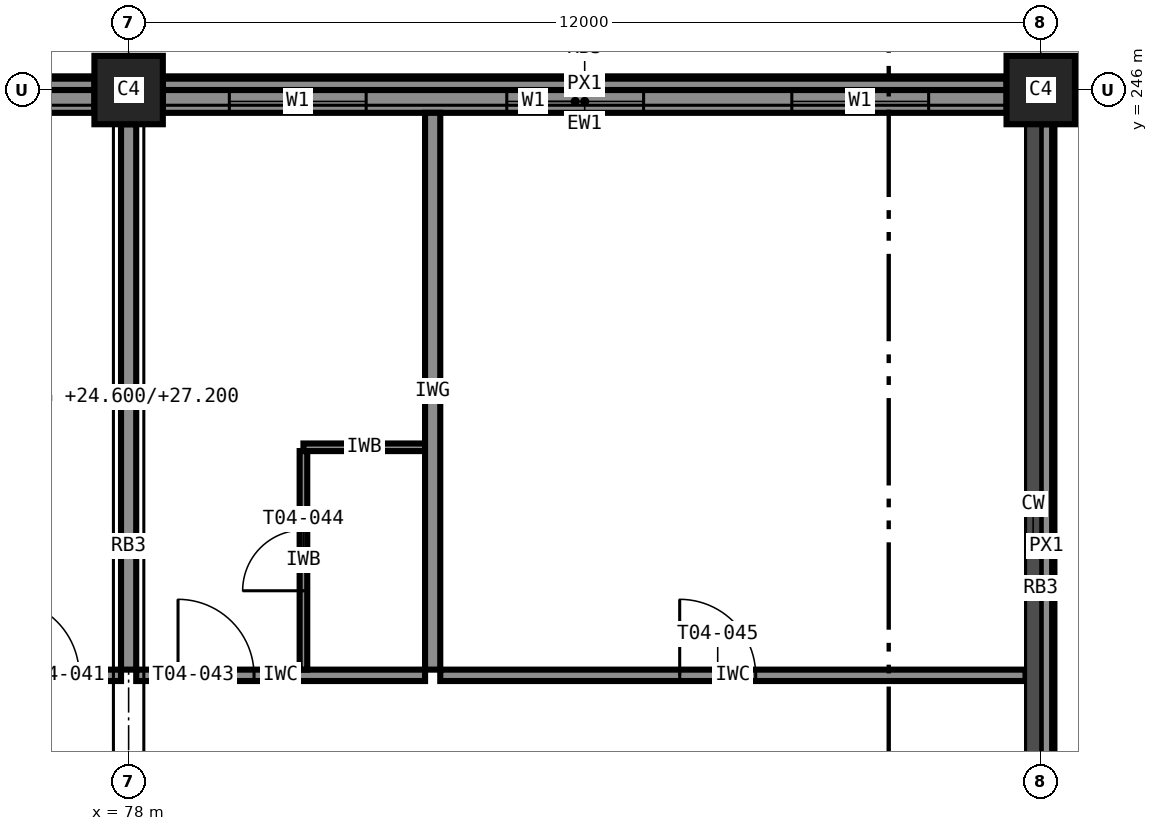
"""IFC4 building model, lengths in metres.
Left out: names, types, materials, properties, quantities, classifications, styles, units other than length and angle.
Written with IfcOpenShell. Run it as: python <this file> out.ifc"""

import sys

from ifc_helpers import new_model, si_unit, direction, frame, frame_2d, origin, origin_2d, place, context, subcontext, project, spatial, rectangle, extrude, element, fill, save


model = new_model("IFC4")
c1 = context("Model", 3, precision=1e-05, world=origin(), true_north=direction((0.0, 1.0)))
c2 = subcontext(c1, "Body", "Model", "MODEL_VIEW")
j1 = project(units=[si_unit("LENGTHUNIT", "METRE"), si_unit("PLANEANGLEUNIT", "RADIAN")], contexts=[c1])
p1 = place(None, origin())
s1 = spatial("IfcSite", under=j1, at=p1, CompositionType="ELEMENT")
p2 = place(p1, origin())
s2 = spatial("IfcBuilding", under=s1, at=p2, CompositionType="ELEMENT")
p3 = place(p2, frame((0.0, 0.0, 24.6)))
s3 = spatial("IfcBuildingStorey", under=s2, at=p3, CompositionType="ELEMENT", Elevation=24.6)
for number, where, z_axis, x_axis in (
    (1, (78.0, 246.0, 0.0), (0.0, 0.0, 1.0), (1.0, 0.0, 0.0)),
    (2, (90.0, 246.0, 0.0), (0.0, 0.0, 1.0), (1.0, 0.0, 0.0)),
):
    element("IfcColumn", number, at=place(p3, frame(where, z_axis=z_axis, x_axis=x_axis)), inside=s3, PredefinedType="COLUMN", context=c2, shape_type="SweptSolid", body=[
        extrude(rectangle(XDim=0.9, YDim=0.9, at=origin_2d()), origin(), (0.0, 0.0, 1.0), 3.6),
    ])
p4 = place(p3, frame((90.075, 234.45, 3.4), z_axis=(0.0, 0.0, 1.0), x_axis=(0.0, 1.0, 0.0)))
e3 = element("IfcWall", 3, at=p4, inside=s3, PredefinedType="STANDARD", context=c2, shape_type="SweptSolid", body=[
    extrude(rectangle(XDim=11.1, YDim=0.15, at=frame_2d((5.55, 0.0))), origin(), (0.0, 0.0, 1.0), 0.2),
])
p5 = place(p3, frame((89.55, 245.85, 0.0), z_axis=(0.0, 0.0, 1.0), x_axis=(-1.0, 0.0, 0.0)))
e4 = element("IfcWall", 4, at=p5, inside=s3, PredefinedType="STANDARD", context=c2, shape_type="SweptSolid", body=[
    extrude(rectangle(XDim=11.1, YDim=0.3, at=frame_2d((5.55, 0.0))), origin(), (0.0, 0.0, 1.0), 2.6),
])
p6 = place(p5, frame((8.425, 0.0, 0.85)))
e5 = element("IfcOpeningElement", 5, at=p6, cuts=e4, PredefinedType="OPENING", context=c2, shape_type="SweptSolid", body=[
    extrude(rectangle(XDim=1.8, YDim=1.75, at=frame_2d((0.9, 0.875))), frame((0.0, 0.16, 0.0), z_axis=(0.0, -1.0, 0.0), x_axis=(1.0, 0.0, 0.0)), (0.0, 0.0, 1.0), 0.32),
])
p7 = place(p5, frame((1.025, 0.0, 0.85)))
e6 = element("IfcOpeningElement", 6, at=p7, cuts=e4, PredefinedType="OPENING", context=c2, shape_type="SweptSolid", body=[
    extrude(rectangle(XDim=1.8, YDim=1.75, at=frame_2d((0.9, 0.875))), frame((0.0, 0.16, 0.0), z_axis=(0.0, -1.0, 0.0), x_axis=(1.0, 0.0, 0.0)), (0.0, 0.0, 1.0), 0.32),
])
p8 = place(p5, frame((4.775, 0.0, 0.85)))
e7 = element("IfcOpeningElement", 7, at=p8, cuts=e4, PredefinedType="OPENING", context=c2, shape_type="SweptSolid", body=[
    extrude(rectangle(XDim=1.8, YDim=1.75, at=frame_2d((0.9, 0.875))), frame((0.0, 0.16, 0.0), z_axis=(0.0, -1.0, 0.0), x_axis=(1.0, 0.0, 0.0)), (0.0, 0.0, 1.0), 0.32),
])
p9 = place(p3, frame((77.55, 245.85, 0.0), z_axis=(0.0, 0.0, 1.0), x_axis=(-1.0, 0.0, 0.0)))
e8 = element("IfcWall", 8, at=p9, inside=s3, PredefinedType="STANDARD", context=c2, shape_type="SweptSolid", body=[
    extrude(rectangle(XDim=11.1, YDim=0.3, at=frame_2d((5.55, 0.0))), origin(), (0.0, 0.0, 1.0), 2.6),
])
p10 = place(p9, frame((8.425, 0.0, 0.85)))
e9 = element("IfcOpeningElement", 9, at=p10, cuts=e8, PredefinedType="OPENING", context=c2, shape_type="SweptSolid", body=[
    extrude(rectangle(XDim=1.8, YDim=1.75, at=frame_2d((0.9, 0.875))), frame((0.0, 0.16, 0.0), z_axis=(0.0, -1.0, 0.0), x_axis=(1.0, 0.0, 0.0)), (0.0, 0.0, 1.0), 0.32),
])
p11 = place(p9, frame((4.65, 0.0, 0.85)))
e10 = element("IfcOpeningElement", 10, at=p11, cuts=e8, PredefinedType="OPENING", context=c2, shape_type="SweptSolid", body=[
    extrude(rectangle(XDim=1.8, YDim=1.75, at=frame_2d((0.9, 0.875))), frame((0.0, 0.16, 0.0), z_axis=(0.0, -1.0, 0.0), x_axis=(1.0, 0.0, 0.0)), (0.0, 0.0, 1.0), 0.32),
])
p12 = place(p9, frame((0.875, 0.0, 0.85)))
e11 = element("IfcOpeningElement", 11, at=p12, cuts=e8, PredefinedType="OPENING", context=c2, shape_type="SweptSolid", body=[
    extrude(rectangle(XDim=1.8, YDim=1.75, at=frame_2d((0.9, 0.875))), frame((0.0, 0.16, 0.0), z_axis=(0.0, -1.0, 0.0), x_axis=(1.0, 0.0, 0.0)), (0.0, 0.0, 1.0), 0.32),
])
for number, where, z_axis, x_axis in (
    (12, (89.55, 246.075, 3.4), (0.0, 0.0, 1.0), (-1.0, 0.0, 0.0)),
    (13, (77.55, 246.075, 3.4), (0.0, 0.0, 1.0), (-1.0, 0.0, 0.0)),
):
    element("IfcWall", number, at=place(p3, frame(where, z_axis=z_axis, x_axis=x_axis)), inside=s3, PredefinedType="STANDARD", context=c2, shape_type="SweptSolid", body=[
        extrude(rectangle(XDim=11.1, YDim=0.15, at=frame_2d((5.55, 0.0))), origin(), (0.0, 0.0, 1.0), 0.2),
    ])
p13 = place(p3, frame((74.1, 238.3, 0.0), z_axis=(0.0, 0.0, 1.0), x_axis=(1.0, 0.0, 0.0)))
e14 = element("IfcWall", 14, at=p13, inside=s3, PredefinedType="PARTITIONING", context=c2, shape_type="SweptSolid", body=[
    extrude(rectangle(XDim=3.8, YDim=0.15, at=frame_2d((1.9, 0.0))), origin(), (0.0, 0.0, 1.0), 3.4),
])
p14 = place(p13, frame((2.25, 0.0, 0.0)))
e15 = element("IfcOpeningElement", 15, at=p14, cuts=e14, PredefinedType="OPENING", context=c2, shape_type="SweptSolid", body=[
    extrude(rectangle(XDim=1.0, YDim=2.1, at=frame_2d((0.5, 1.05))), frame((0.0, 0.085, 0.0), z_axis=(0.0, -1.0, 0.0), x_axis=(1.0, 0.0, 0.0)), (0.0, 0.0, 1.0), 0.17),
])
p15 = place(p3, frame((78.1, 238.3, 0.0), z_axis=(0.0, 0.0, 1.0), x_axis=(1.0, 0.0, 0.0)))
e16 = element("IfcWall", 16, at=p15, inside=s3, PredefinedType="PARTITIONING", context=c2, shape_type="SweptSolid", body=[
    extrude(rectangle(XDim=3.8, YDim=0.15, at=frame_2d((1.9, 0.0))), origin(), (0.0, 0.0, 1.0), 3.4),
])
p16 = place(p15, frame((0.55, 0.0, 0.0)))
e17 = element("IfcOpeningElement", 17, at=p16, cuts=e16, PredefinedType="OPENING", context=c2, shape_type="SweptSolid", body=[
    extrude(rectangle(XDim=1.0, YDim=2.1, at=frame_2d((0.5, 1.05))), frame((0.0, 0.085, 0.0), z_axis=(0.0, -1.0, 0.0), x_axis=(1.0, 0.0, 0.0)), (0.0, 0.0, 1.0), 0.17),
])
p17 = place(p3, frame((80.3, 241.3, 0.0), z_axis=(0.0, 0.0, 1.0), x_axis=(1.0, 0.0, 0.0)))
e18 = element("IfcWall", 18, at=p17, inside=s3, PredefinedType="PARTITIONING", context=c2, shape_type="SweptSolid", body=[
    extrude(rectangle(XDim=1.6, YDim=0.1, at=frame_2d((0.8, 0.0))), origin(), (0.0, 0.0, 1.0), 3.4),
])
p18 = place(p3, frame((80.3, 238.375, 0.0), z_axis=(0.0, 0.0, 1.0), x_axis=(0.0, 1.0, 0.0)))
e19 = element("IfcWall", 19, at=p18, inside=s3, PredefinedType="PARTITIONING", context=c2, shape_type="SweptSolid", body=[
    extrude(rectangle(XDim=2.875, YDim=0.1, at=frame_2d((1.438, 0.0))), origin(), (0.0, 0.0, 1.0), 3.4),
])
p19 = place(p18, frame((1.038, 0.0, 0.0)))
e20 = element("IfcOpeningElement", 20, at=p19, cuts=e19, PredefinedType="OPENING", context=c2, shape_type="SweptSolid", body=[
    extrude(rectangle(XDim=0.8, YDim=2.1, at=frame_2d((0.4, 1.05))), frame((0.0, 0.06, 0.0), z_axis=(0.0, -1.0, 0.0), x_axis=(1.0, 0.0, 0.0)), (0.0, 0.0, 1.0), 0.12),
])
p20 = place(p3, frame((82.1, 238.3, 0.0), z_axis=(0.0, 0.0, 1.0), x_axis=(1.0, 0.0, 0.0)))
e21 = element("IfcWall", 21, at=p20, inside=s3, PredefinedType="PARTITIONING", context=c2, shape_type="SweptSolid", body=[
    extrude(rectangle(XDim=7.7, YDim=0.15, at=frame_2d((3.85, 0.0))), origin(), (0.0, 0.0, 1.0), 3.4),
])
p21 = place(p20, frame((3.15, 0.0, 0.0)))
e22 = element("IfcOpeningElement", 22, at=p21, cuts=e21, PredefinedType="OPENING", context=c2, shape_type="SweptSolid", body=[
    extrude(rectangle(XDim=1.0, YDim=2.1, at=frame_2d((0.5, 1.05))), frame((0.0, 0.085, 0.0), z_axis=(0.0, -1.0, 0.0), x_axis=(1.0, 0.0, 0.0)), (0.0, 0.0, 1.0), 0.17),
])
p22 = place(p3, frame((78.0, 245.55, 0.0), z_axis=(0.0, 0.0, 1.0), x_axis=(0.0, -1.0, 0.0)))
e23 = element("IfcWall", 23, at=p22, inside=s3, PredefinedType="PARTITIONING", context=c2, shape_type="SweptSolid", body=[
    extrude(rectangle(XDim=7.175, YDim=0.2, at=frame_2d((3.587, 0.0))), origin(), (0.0, 0.0, 1.0), 2.6),
])
p23 = place(p3, frame((82.0, 245.7, 0.0), z_axis=(0.0, 0.0, 1.0), x_axis=(0.0, -1.0, 0.0)))
e24 = element("IfcWall", 24, at=p23, inside=s3, PredefinedType="PARTITIONING", context=c2, shape_type="SweptSolid", body=[
    extrude(rectangle(XDim=7.325, YDim=0.2, at=frame_2d((3.663, 0.0))), origin(), (0.0, 0.0, 1.0), 3.4),
])
p24 = place(p6, origin())
e25 = element("IfcWindow", 25, at=p24, inside=s3, PartitioningType="SINGLE_PANEL", PredefinedType="WINDOW", context=c2, shape_type="SweptSolid", body=[
    extrude(rectangle(XDim=1.8, YDim=1.75, at=frame_2d((0.9, 0.875))), frame((0.0, 0.03, 0.0), z_axis=(0.0, -1.0, 0.0), x_axis=(1.0, 0.0, 0.0)), (0.0, 0.0, 1.0), 0.06),
])
fill(e5, e25)
p25 = place(p7, origin())
e26 = element("IfcWindow", 26, at=p25, inside=s3, PartitioningType="SINGLE_PANEL", PredefinedType="WINDOW", context=c2, shape_type="SweptSolid", body=[
    extrude(rectangle(XDim=1.8, YDim=1.75, at=frame_2d((0.9, 0.875))), frame((0.0, 0.03, 0.0), z_axis=(0.0, -1.0, 0.0), x_axis=(1.0, 0.0, 0.0)), (0.0, 0.0, 1.0), 0.06),
])
fill(e6, e26)
p26 = place(p8, origin())
e27 = element("IfcWindow", 27, at=p26, inside=s3, PartitioningType="SINGLE_PANEL", PredefinedType="WINDOW", context=c2, shape_type="SweptSolid", body=[
    extrude(rectangle(XDim=1.8, YDim=1.75, at=frame_2d((0.9, 0.875))), frame((0.0, 0.03, 0.0), z_axis=(0.0, -1.0, 0.0), x_axis=(1.0, 0.0, 0.0)), (0.0, 0.0, 1.0), 0.06),
])
fill(e7, e27)
p27 = place(p14, origin())
e28 = element("IfcDoor", 28, at=p27, inside=s3, OperationType="SINGLE_SWING_LEFT", PredefinedType="DOOR", context=c2, shape_type="SweptSolid", body=[
    extrude(rectangle(XDim=1.0, YDim=2.1, at=frame_2d((0.5, 1.05))), frame((0.0, 0.025, 0.0), z_axis=(0.0, -1.0, 0.0), x_axis=(1.0, 0.0, 0.0)), (0.0, 0.0, 1.0), 0.05),
])
fill(e15, e28)
p28 = place(p16, origin())
e29 = element("IfcDoor", 29, at=p28, inside=s3, OperationType="SINGLE_SWING_LEFT", PredefinedType="DOOR", context=c2, shape_type="SweptSolid", body=[
    extrude(rectangle(XDim=1.0, YDim=2.1, at=frame_2d((0.5, 1.05))), frame((0.0, 0.025, 0.0), z_axis=(0.0, -1.0, 0.0), x_axis=(1.0, 0.0, 0.0)), (0.0, 0.0, 1.0), 0.05),
])
fill(e17, e29)
p29 = place(p19, origin())
e30 = element("IfcDoor", 30, at=p29, inside=s3, OperationType="SINGLE_SWING_LEFT", PredefinedType="DOOR", context=c2, shape_type="SweptSolid", body=[
    extrude(rectangle(XDim=0.8, YDim=2.1, at=frame_2d((0.4, 1.05))), frame((0.0, 0.025, 0.0), z_axis=(0.0, -1.0, 0.0), x_axis=(1.0, 0.0, 0.0)), (0.0, 0.0, 1.0), 0.05),
])
fill(e20, e30)
p30 = place(p21, origin())
e31 = element("IfcDoor", 31, at=p30, inside=s3, OperationType="SINGLE_SWING_LEFT", PredefinedType="DOOR", context=c2, shape_type="SweptSolid", body=[
    extrude(rectangle(XDim=1.0, YDim=2.1, at=frame_2d((0.5, 1.05))), frame((0.0, 0.025, 0.0), z_axis=(0.0, -1.0, 0.0), x_axis=(1.0, 0.0, 0.0)), (0.0, 0.0, 1.0), 0.05),
])
fill(e22, e31)
save(model, sys.argv[1])
